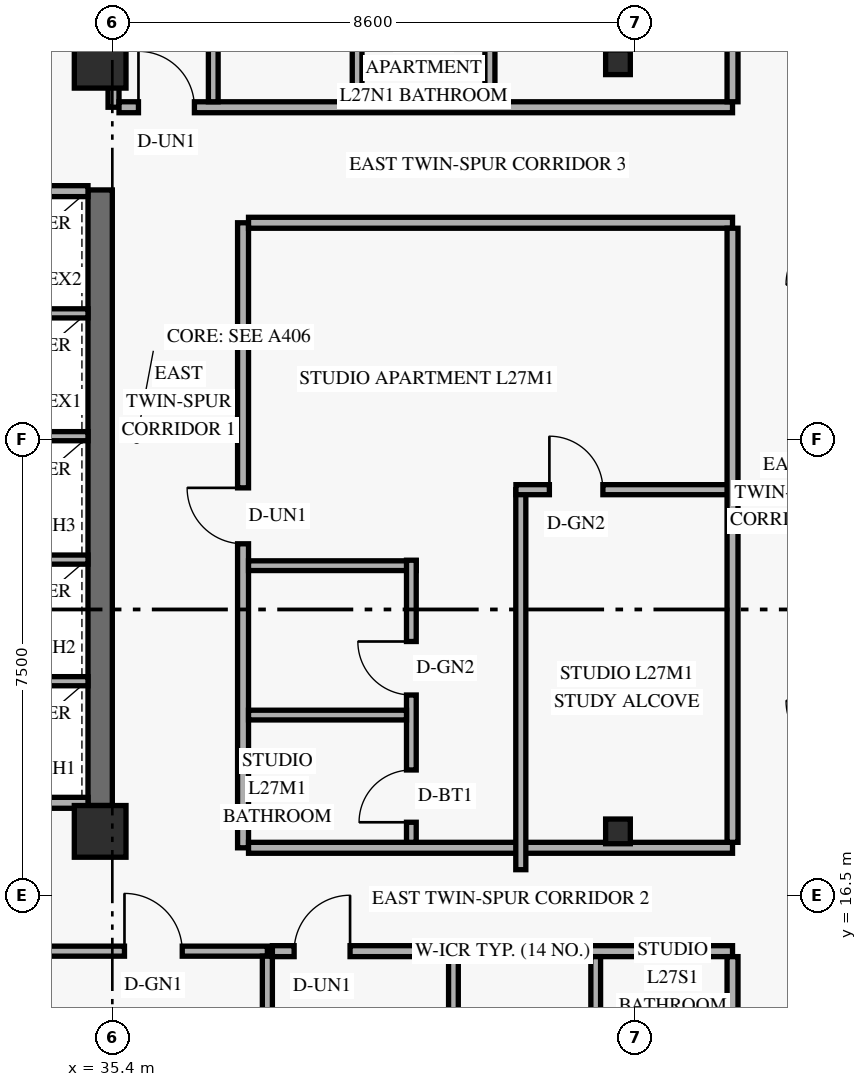
"""IFC4 building model, lengths in metres.
Left out: names, types, materials, properties, quantities, classifications, styles, units other than length and angle.
Written with IfcOpenShell. Run it as: python <this file> out.ifc"""

import sys

from ifc_helpers import new_model, si_unit, direction, frame, frame_2d, origin, origin_2d, place, context, subcontext, project, spatial, rectangle, hollow_rectangle, extrude, element, fill, save


model = new_model("IFC4")
c1 = context("Model", 3, precision=1e-05, world=origin(), true_north=direction((0.0, 1.0)))
c2 = subcontext(c1, "Body", "Model", "MODEL_VIEW")
j1 = project(units=[si_unit("LENGTHUNIT", "METRE"), si_unit("PLANEANGLEUNIT", "RADIAN")], contexts=[c1])
p1 = place(None, origin())
s1 = spatial("IfcSite", under=j1, at=p1, CompositionType="ELEMENT")
p2 = place(p1, origin())
s2 = spatial("IfcBuilding", under=s1, at=p2, CompositionType="ELEMENT")
p3 = place(p2, frame((0.0, 0.0, 106.2)))
s3 = spatial("IfcBuildingStorey", under=s2, at=p3, CompositionType="ELEMENT", Elevation=106.2)
p4 = place(p3, frame((35.2, 17.975, 0.0), z_axis=(0.0, 0.0, 1.0), x_axis=(0.0, 1.0, 0.0)))
e1 = element("IfcWall", 1, at=p4, inside=s3, PredefinedType="SHEAR", context=c2, shape_type="SweptSolid", body=[
    extrude(rectangle(XDim=10.125, YDim=0.4, at=frame_2d((5.062, 0.0))), origin(), (0.0, 0.0, 1.0), 2.749),
])
for number, where, z_axis, x_axis in (
    (2, (35.2, 17.55, 0.0), (0.0, 0.0, 1.0), (1.0, 0.0, 0.0)),
    (3, (35.2, 30.2, 0.0), (0.0, 0.0, 1.0), (1.0, 0.0, 0.0)),
):
    element("IfcColumn", number, at=place(p3, frame(where, z_axis=z_axis, x_axis=x_axis)), inside=s3, PredefinedType="COLUMN", context=c2, shape_type="SweptSolid", body=[
        extrude(rectangle(XDim=0.85, YDim=0.85, at=origin_2d()), origin(), (0.0, 0.0, 1.0), 3.6),
    ])
for number, where, z_axis, x_axis in (
    (4, (43.653, 17.55, 0.0), (0.035, 0.0, 0.999), (0.0, 1.0, 0.0)),
    (5, (43.653, 30.2, 0.0), (0.035, 0.0, 0.999), (0.0, 1.0, 0.0)),
):
    element("IfcColumn", number, at=place(p3, frame(where, z_axis=z_axis, x_axis=x_axis)), inside=s3, PredefinedType="COLUMN", context=c2, shape_type="SweptSolid", body=[
        extrude(hollow_rectangle(XDim=0.406, YDim=0.406, WallThickness=0.016, at=origin_2d()), origin(), (0.0, 0.0, 1.0), 3.602),
    ])
for number, where, z_axis, x_axis in (
    (6, (32.74, 18.02, 0.0), (0.0, 0.0, 1.0), (1.0, 0.0, 0.0)),
    (7, (32.74, 28.08, 0.0), (0.0, 0.0, 1.0), (1.0, 0.0, 0.0)),
):
    element("IfcWall", number, at=place(p3, frame(where, z_axis=z_axis, x_axis=x_axis)), inside=s3, PredefinedType="STANDARD", context=c2, shape_type="SweptSolid", body=[
        extrude(rectangle(XDim=2.26, YDim=0.18, at=frame_2d((1.13, 0.0))), origin(), (0.0, 0.0, 1.0), 3.36),
    ])
for number, where, z_axis, x_axis in (
    (8, (32.74, 20.02, 0.0), (0.0, 0.0, 1.0), (1.0, 0.0, 0.0)),
    (9, (32.74, 22.02, 0.0), (0.0, 0.0, 1.0), (1.0, 0.0, 0.0)),
    (10, (32.74, 24.05, 0.0), (0.0, 0.0, 1.0), (1.0, 0.0, 0.0)),
    (11, (32.74, 26.07, 0.0), (0.0, 0.0, 1.0), (1.0, 0.0, 0.0)),
):
    element("IfcWall", number, at=place(p3, frame(where, z_axis=z_axis, x_axis=x_axis)), inside=s3, PredefinedType="STANDARD", context=c2, shape_type="SweptSolid", body=[
        extrude(rectangle(XDim=2.26, YDim=0.15, at=frame_2d((1.13, 0.0))), origin(), (0.0, 0.0, 1.0), 3.36),
    ])
p5 = place(p3, frame((32.732, 15.58, 0.0), z_axis=(0.0, 0.0, 1.0), x_axis=(1.0, 0.0, 0.0)))
e12 = element("IfcWall", 12, at=p5, inside=s3, PredefinedType="PARTITIONING", context=c2, shape_type="SweptSolid", body=[
    extrude(rectangle(XDim=5.218, YDim=0.165, at=frame_2d((2.609, 0.0))), origin(), (0.0, 0.0, 1.0), 2.731),
])
p6 = place(p5, frame((2.867, 0.0, 0.0)))
e13 = element("IfcOpeningElement", 13, at=p6, cuts=e12, PredefinedType="OPENING", context=c2, shape_type="SweptSolid", body=[
    extrude(rectangle(XDim=0.95, YDim=2.15, at=frame_2d((0.475, 1.075))), frame((0.0, 0.093, 0.0), z_axis=(0.0, -1.0, 0.0), x_axis=(1.0, 0.0, 0.0)), (0.0, 0.0, 1.0), 0.185),
])
p7 = place(p3, frame((37.95, 9.25, 0.0), z_axis=(0.0, 0.0, 1.0), x_axis=(0.0, 1.0, 0.0)))
e14 = element("IfcWall", 14, at=p7, inside=s3, PredefinedType="PARTITIONING", context=c2, shape_type="SweptSolid", body=[
    extrude(rectangle(XDim=6.248, YDim=0.165, at=frame_2d((3.124, 0.0))), origin(), (0.0, 0.0, 1.0), 2.731),
])
p8 = place(p3, frame((37.55, 17.28, 0.0), z_axis=(0.0, 0.0, 1.0), x_axis=(0.0, 1.0, 0.0)))
e15 = element("IfcWall", 15, at=p8, inside=s3, PredefinedType="STANDARD", context=c2, shape_type="SweptSolid", body=[
    extrude(rectangle(XDim=10.28, YDim=0.18, at=frame_2d((5.14, 0.0))), origin(), (0.0, 0.0, 1.0), 2.731),
])
p9 = place(p8, frame((5.0, 0.0, 0.0)))
e16 = element("IfcOpeningElement", 16, at=p9, cuts=e15, PredefinedType="OPENING", context=c2, shape_type="SweptSolid", body=[
    extrude(rectangle(XDim=0.92, YDim=2.15, at=frame_2d((0.46, 1.075))), frame((0.0, 0.1, 0.0), z_axis=(0.0, -1.0, 0.0), x_axis=(1.0, 0.0, 0.0)), (0.0, 0.0, 1.0), 0.2),
])
p10 = place(p3, frame((38.032, 15.58, 0.0), z_axis=(0.0, 0.0, 1.0), x_axis=(1.0, 0.0, 0.0)))
e17 = element("IfcWall", 17, at=p10, inside=s3, PredefinedType="STANDARD", context=c2, shape_type="SweptSolid", body=[
    extrude(rectangle(XDim=7.568, YDim=0.18, at=frame_2d((3.784, 0.0))), origin(), (0.0, 0.0, 1.0), 2.731),
])
p11 = place(p10, frame((0.357, 0.0, 0.0)))
e18 = element("IfcOpeningElement", 18, at=p11, cuts=e17, PredefinedType="OPENING", context=c2, shape_type="SweptSolid", body=[
    extrude(rectangle(XDim=0.92, YDim=2.15, at=frame_2d((0.46, 1.075))), frame((0.0, 0.1, 0.0), z_axis=(0.0, -1.0, 0.0), x_axis=(1.0, 0.0, 0.0)), (0.0, 0.0, 1.0), 0.2),
])
for number, where, z_axis, x_axis in (
    (19, (37.64, 17.28, 0.0), (0.0, 0.0, 1.0), (1.0, 0.0, 0.0)),
    (20, (37.64, 27.56, 0.0), (0.0, 0.0, 1.0), (1.0, 0.0, 0.0)),
):
    element("IfcWall", number, at=place(p3, frame(where, z_axis=z_axis, x_axis=x_axis)), inside=s3, PredefinedType="STANDARD", context=c2, shape_type="SweptSolid", body=[
        extrude(rectangle(XDim=7.96, YDim=0.18, at=frame_2d((3.98, 0.0))), origin(), (0.0, 0.0, 1.0), 2.731),
    ])
p12 = place(p3, frame((35.42, 29.46, 0.0), z_axis=(0.0, 0.0, 1.0), x_axis=(0.0, 1.0, 0.0)))
e21 = element("IfcWall", 21, at=p12, inside=s3, PredefinedType="STANDARD", context=c2, shape_type="SweptSolid", body=[
    extrude(rectangle(XDim=1.89, YDim=0.18, at=frame_2d((0.945, 0.0))), origin(), (0.0, 0.0, 1.0), 2.731),
])
p13 = place(p3, frame((35.51, 29.46, 0.0), z_axis=(0.0, 0.0, 1.0), x_axis=(1.0, 0.0, 0.0)))
e22 = element("IfcWall", 22, at=p13, inside=s3, PredefinedType="STANDARD", context=c2, shape_type="SweptSolid", body=[
    extrude(rectangle(XDim=10.09, YDim=0.18, at=frame_2d((5.045, 0.0))), origin(), (0.0, 0.0, 1.0), 2.731),
])
p14 = place(p13, frame((0.32, 0.0, 0.0)))
e23 = element("IfcOpeningElement", 23, at=p14, cuts=e22, PredefinedType="OPENING", context=c2, shape_type="SweptSolid", body=[
    extrude(rectangle(XDim=0.92, YDim=2.15, at=frame_2d((0.46, 1.075))), frame((0.0, 0.1, 0.0), z_axis=(0.0, -1.0, 0.0), x_axis=(1.0, 0.0, 0.0)), (0.0, 0.0, 1.0), 0.2),
])
p15 = place(p3, frame((41.01, 13.06, 0.0), z_axis=(0.0, 0.0, 1.0), x_axis=(0.0, 1.0, 0.0)))
e24 = element("IfcWall", 24, at=p15, inside=s3, PredefinedType="PLUMBINGWALL", context=c2, shape_type="SweptSolid", body=[
    extrude(rectangle(XDim=2.43, YDim=0.16, at=frame_2d((1.215, 0.0))), origin(), (0.0, 0.0, 1.0), 2.988),
])
p16 = place(p3, frame((43.35, 13.22, 0.0), z_axis=(0.0, 0.0, 1.0), x_axis=(0.0, 1.0, 0.0)))
e25 = element("IfcWall", 25, at=p16, inside=s3, PredefinedType="PLUMBINGWALL", context=c2, shape_type="SweptSolid", body=[
    extrude(rectangle(XDim=2.27, YDim=0.16, at=frame_2d((1.135, 0.0))), origin(), (0.0, 0.0, 1.0), 2.988),
])
p17 = place(p3, frame((41.61, 29.55, 0.0), z_axis=(0.0, 0.0, 1.0), x_axis=(0.0, 1.0, 0.0)))
e26 = element("IfcWall", 26, at=p17, inside=s3, PredefinedType="PARTITIONING", context=c2, shape_type="SweptSolid", body=[
    extrude(rectangle(XDim=15.47, YDim=0.165, at=frame_2d((7.735, 0.0))), origin(), (0.0, 0.0, 1.0), 2.731),
])
p18 = place(p17, frame((4.917, 0.0, 0.0)))
e27 = element("IfcOpeningElement", 27, at=p18, cuts=e26, PredefinedType="OPENING", context=c2, shape_type="SweptSolid", body=[
    extrude(rectangle(XDim=0.88, YDim=2.14, at=frame_2d((0.44, 1.07))), frame((0.0, 0.093, 0.0), z_axis=(0.0, -1.0, 0.0), x_axis=(1.0, 0.0, 0.0)), (0.0, 0.0, 1.0), 0.185),
])
p19 = place(p17, frame((9.255, 0.0, 0.0)))
e28 = element("IfcOpeningElement", 28, at=p19, cuts=e26, PredefinedType="OPENING", context=c2, shape_type="SweptSolid", body=[
    extrude(rectangle(XDim=0.88, YDim=2.12, at=frame_2d((0.44, 1.06))), frame((0.0, 0.093, 0.0), z_axis=(0.0, -1.0, 0.0), x_axis=(1.0, 0.0, 0.0)), (0.0, 0.0, 1.0), 0.185),
])
p20 = place(p3, frame((37.06, 29.55, 0.0), z_axis=(0.0, 0.0, 1.0), x_axis=(0.0, 1.0, 0.0)))
e29 = element("IfcWall", 29, at=p20, inside=s3, PredefinedType="PLUMBINGWALL", context=c2, shape_type="SweptSolid", body=[
    extrude(rectangle(XDim=2.625, YDim=0.16, at=frame_2d((1.312, 0.0))), origin(), (0.0, 0.0, 1.0), 2.731),
])
p21 = place(p3, frame((39.426, 29.55, 0.0), z_axis=(0.0, 0.0, 1.0), x_axis=(0.0, 1.0, 0.0)))
e30 = element("IfcWall", 30, at=p21, inside=s3, PredefinedType="PLUMBINGWALL", context=c2, shape_type="SweptSolid", body=[
    extrude(rectangle(XDim=2.465, YDim=0.16, at=frame_2d((1.232, 0.0))), origin(), (0.0, 0.0, 1.0), 2.731),
])
p22 = place(p3, frame((37.64, 21.92, 0.0), z_axis=(0.0, 0.0, 1.0), x_axis=(1.0, 0.0, 0.0)))
e31 = element("IfcWall", 31, at=p22, inside=s3, PredefinedType="PLUMBINGWALL", context=c2, shape_type="SweptSolid", body=[
    extrude(rectangle(XDim=2.758, YDim=0.16, at=frame_2d((1.379, 0.0))), origin(), (0.0, 0.0, 1.0), 3.36),
])
p23 = place(p3, frame((40.318, 17.37, 0.0), z_axis=(0.0, 0.0, 1.0), x_axis=(0.0, 1.0, 0.0)))
e32 = element("IfcWall", 32, at=p23, inside=s3, PredefinedType="PLUMBINGWALL", context=c2, shape_type="SweptSolid", body=[
    extrude(rectangle(XDim=4.64, YDim=0.16, at=frame_2d((2.32, 0.0))), origin(), (0.0, 0.0, 1.0), 2.731),
])
p24 = place(p23, frame((0.33, 0.0, 0.0)))
e33 = element("IfcOpeningElement", 33, at=p24, cuts=e32, PredefinedType="OPENING", context=c2, shape_type="SweptSolid", body=[
    extrude(rectangle(XDim=0.86, YDim=2.12, at=frame_2d((0.43, 1.06))), frame((0.0, 0.09, 0.0), z_axis=(0.0, -1.0, 0.0), x_axis=(1.0, 0.0, 0.0)), (0.0, 0.0, 1.0), 0.18),
])
p25 = place(p23, frame((2.423, 0.0, 0.0)))
e34 = element("IfcOpeningElement", 34, at=p25, cuts=e32, PredefinedType="OPENING", context=c2, shape_type="SweptSolid", body=[
    extrude(rectangle(XDim=0.88, YDim=2.12, at=frame_2d((0.44, 1.06))), frame((0.0, 0.09, 0.0), z_axis=(0.0, -1.0, 0.0), x_axis=(1.0, 0.0, 0.0)), (0.0, 0.0, 1.0), 0.18),
])
p26 = place(p3, frame((37.64, 19.463, 0.0), z_axis=(0.0, 0.0, 1.0), x_axis=(1.0, 0.0, 0.0)))
e35 = element("IfcWall", 35, at=p26, inside=s3, PredefinedType="PLUMBINGWALL", context=c2, shape_type="SweptSolid", body=[
    extrude(rectangle(XDim=2.598, YDim=0.16, at=frame_2d((1.299, 0.0))), origin(), (0.0, 0.0, 1.0), 3.36),
])
p27 = place(p3, frame((42.118, 16.92, 0.0), z_axis=(0.0, 0.0, 1.0), x_axis=(0.0, 1.0, 0.0)))
e36 = element("IfcWall", 36, at=p27, inside=s3, PredefinedType="PARTITIONING", context=c2, shape_type="SweptSolid", body=[
    extrude(rectangle(XDim=6.25, YDim=0.165, at=frame_2d((3.125, 0.0))), origin(), (0.0, 0.0, 1.0), 2.731),
])
p28 = place(p3, frame((42.038, 23.17, 0.0), z_axis=(0.0, 0.0, 1.0), x_axis=(1.0, 0.0, 0.0)))
e37 = element("IfcWall", 37, at=p28, inside=s3, PredefinedType="PARTITIONING", context=c2, shape_type="SweptSolid", body=[
    extrude(rectangle(XDim=3.922, YDim=0.165, at=frame_2d((1.961, 0.0))), origin(), (0.0, 0.0, 1.0), 2.731),
])
p29 = place(p28, frame((0.55, 0.0, 0.0)))
e38 = element("IfcOpeningElement", 38, at=p29, cuts=e37, PredefinedType="OPENING", context=c2, shape_type="SweptSolid", body=[
    extrude(rectangle(XDim=0.88, YDim=2.12, at=frame_2d((0.44, 1.06))), frame((0.0, 0.093, 0.0), z_axis=(0.0, -1.0, 0.0), x_axis=(1.0, 0.0, 0.0)), (0.0, 0.0, 1.0), 0.185),
])
p30 = place(p3, frame((45.6, 2.98, 0.0), z_axis=(0.0, 0.0, 1.0), x_axis=(0.0, 1.0, 0.0)))
e39 = element("IfcWall", 39, at=p30, inside=s3, PredefinedType="STANDARD", context=c2, shape_type="SweptSolid", body=[
    extrude(rectangle(XDim=12.51, YDim=0.18, at=frame_2d((6.255, 0.0))), origin(), (0.0, 0.0, 1.0), 2.731),
])
p31 = place(p3, frame((45.6, 17.37, 0.0), z_axis=(0.0, 0.0, 1.0), x_axis=(0.0, 1.0, 0.0)))
e40 = element("IfcWall", 40, at=p31, inside=s3, PredefinedType="STANDARD", context=c2, shape_type="SweptSolid", body=[
    extrude(rectangle(XDim=10.1, YDim=0.18, at=frame_2d((5.05, 0.0))), origin(), (0.0, 0.0, 1.0), 2.731),
])
p32 = place(p3, frame((45.6, 29.55, 0.0), z_axis=(0.0, 0.0, 1.0), x_axis=(0.0, 1.0, 0.0)))
e41 = element("IfcWall", 41, at=p32, inside=s3, PredefinedType="STANDARD", context=c2, shape_type="SweptSolid", body=[
    extrude(rectangle(XDim=15.47, YDim=0.18, at=frame_2d((7.735, 0.0))), origin(), (0.0, 0.0, 1.0), 2.731),
])
p33 = place(p6, origin())
e42 = element("IfcDoor", 42, at=p33, inside=s3, OperationType="SINGLE_SWING_LEFT", PredefinedType="DOOR", context=c2, shape_type="SweptSolid", body=[
    extrude(rectangle(XDim=0.95, YDim=2.15, at=frame_2d((0.475, 1.075))), frame((0.0, 0.025, 0.0), z_axis=(0.0, -1.0, 0.0), x_axis=(1.0, 0.0, 0.0)), (0.0, 0.0, 1.0), 0.05),
])
fill(e13, e42)
p34 = place(p11, origin())
e43 = element("IfcDoor", 43, at=p34, inside=s3, OperationType="SINGLE_SWING_RIGHT", PredefinedType="DOOR", context=c2, shape_type="SweptSolid", body=[
    extrude(rectangle(XDim=0.92, YDim=2.15, at=frame_2d((0.46, 1.075))), frame((0.0, 0.025, 0.0), z_axis=(0.0, -1.0, 0.0), x_axis=(1.0, 0.0, 0.0)), (0.0, 0.0, 1.0), 0.05),
])
fill(e18, e43)
p35 = place(p14, origin())
e44 = element("IfcDoor", 44, at=p35, inside=s3, OperationType="SINGLE_SWING_LEFT", PredefinedType="DOOR", context=c2, shape_type="SweptSolid", body=[
    extrude(rectangle(XDim=0.92, YDim=2.15, at=frame_2d((0.46, 1.075))), frame((0.0, 0.025, 0.0), z_axis=(0.0, -1.0, 0.0), x_axis=(1.0, 0.0, 0.0)), (0.0, 0.0, 1.0), 0.05),
])
fill(e23, e44)
p36 = place(p29, origin())
e45 = element("IfcDoor", 45, at=p36, inside=s3, OperationType="SINGLE_SWING_LEFT", PredefinedType="DOOR", context=c2, shape_type="SweptSolid", body=[
    extrude(rectangle(XDim=0.88, YDim=2.12, at=frame_2d((0.44, 1.06))), frame((0.0, 0.025, 0.0), z_axis=(0.0, -1.0, 0.0), x_axis=(1.0, 0.0, 0.0)), (0.0, 0.0, 1.0), 0.05),
])
fill(e38, e45)
p37 = place(p9, origin())
e46 = element("IfcDoor", 46, at=p37, inside=s3, OperationType="SINGLE_SWING_RIGHT", PredefinedType="DOOR", context=c2, shape_type="SweptSolid", body=[
    extrude(rectangle(XDim=0.92, YDim=2.15, at=frame_2d((0.46, 1.075))), frame((0.0, 0.025, 0.0), z_axis=(0.0, -1.0, 0.0), x_axis=(1.0, 0.0, 0.0)), (0.0, 0.0, 1.0), 0.05),
])
fill(e16, e46)
p38 = place(p24, origin())
e47 = element("IfcDoor", 47, at=p38, inside=s3, OperationType="SINGLE_SWING_LEFT", PredefinedType="DOOR", context=c2, shape_type="SweptSolid", body=[
    extrude(rectangle(XDim=0.86, YDim=2.12, at=frame_2d((0.43, 1.06))), frame((0.0, 0.025, 0.0), z_axis=(0.0, -1.0, 0.0), x_axis=(1.0, 0.0, 0.0)), (0.0, 0.0, 1.0), 0.05),
])
fill(e33, e47)
p39 = place(p25, origin())
e48 = element("IfcDoor", 48, at=p39, inside=s3, OperationType="SINGLE_SWING_RIGHT", PredefinedType="DOOR", context=c2, shape_type="SweptSolid", body=[
    extrude(rectangle(XDim=0.88, YDim=2.12, at=frame_2d((0.44, 1.06))), frame((0.0, 0.025, 0.0), z_axis=(0.0, -1.0, 0.0), x_axis=(1.0, 0.0, 0.0)), (0.0, 0.0, 1.0), 0.05),
])
fill(e34, e48)
save(model, sys.argv[1])
